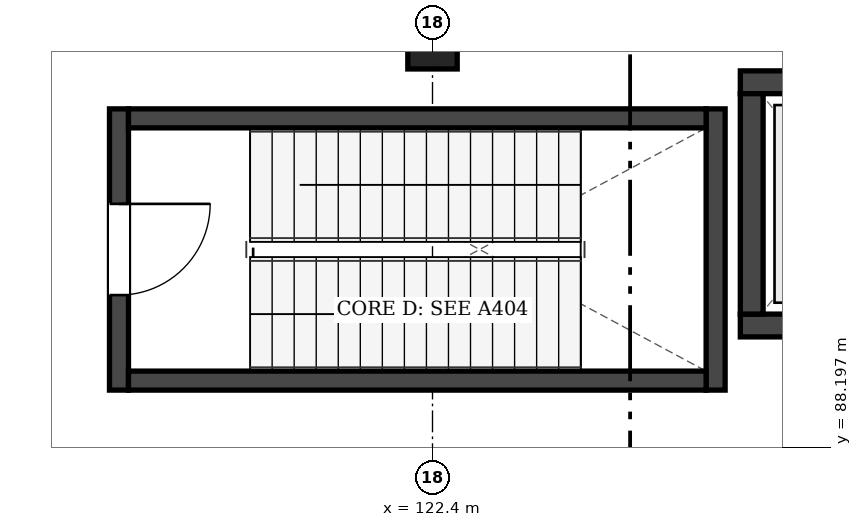
"""IFC4 building model, lengths in metres.
Left out: names, types, materials, properties, quantities, classifications, styles, units other than length and angle.
Written with IfcOpenShell. Run it as: python <this file> out.ifc"""

import sys

from ifc_helpers import new_model, si_unit, direction, frame, frame_2d, origin, origin_2d, place, context, subcontext, project, spatial, rectangle, extrude, element, fill, save


model = new_model("IFC4")
c1 = context("Model", 3, precision=1e-05, world=origin(), true_north=direction((0.0, 1.0)))
c2 = subcontext(c1, "Body", "Model", "MODEL_VIEW")
j1 = project(units=[si_unit("LENGTHUNIT", "METRE"), si_unit("PLANEANGLEUNIT", "RADIAN")], contexts=[c1])
p1 = place(None, origin())
s1 = spatial("IfcSite", under=j1, at=p1, CompositionType="ELEMENT")
p2 = place(p1, origin())
s2 = spatial("IfcBuilding", under=s1, at=p2, CompositionType="ELEMENT")
p3 = place(p2, frame((0.0, 0.0, 4.8)))
s3 = spatial("IfcBuildingStorey", under=s2, at=p3, CompositionType="ELEMENT", Elevation=4.8)
p4 = place(p3, frame((122.4, 93.6, 0.0), z_axis=(0.0, 0.0, 1.0), x_axis=(1.0, 0.0, 0.0)))
e1 = element("IfcColumn", 1, at=p4, inside=s3, PredefinedType="COLUMN", context=c2, shape_type="SweptSolid", body=[
    extrude(rectangle(XDim=0.65, YDim=0.85, at=origin_2d()), origin(), (0.0, 0.0, 1.0), 4.8),
])
p5 = place(p3, frame((126.45, 89.8, 0.0), z_axis=(0.0, 0.0, 1.0), x_axis=(1.0, 0.0, 0.0)))
e2 = element("IfcWall", 2, at=p5, inside=s3, PredefinedType="SHEAR", context=c2, shape_type="SweptSolid", body=[
    extrude(rectangle(XDim=2.9, YDim=0.3, at=frame_2d((1.45, 0.0))), origin(), (0.0, 0.0, 1.0), 4.55),
])
p6 = place(p5, frame((0.75, 0.0, 0.0)))
e3 = element("IfcOpeningElement", 3, at=p6, cuts=e2, PredefinedType="OPENING", context=c2, shape_type="SweptSolid", body=[
    extrude(rectangle(XDim=1.4, YDim=2.2, at=frame_2d((0.7, 1.1))), frame((0.0, 0.162, 0.0), z_axis=(0.0, -1.0, 0.0), x_axis=(1.0, 0.0, 0.0)), (0.0, 0.0, 1.0), 0.324),
])
for number, where, z_axis, x_axis in (
    (4, (126.45, 93.0, 0.0), (0.0, 0.0, 1.0), (1.0, 0.0, 0.0)),
    (5, (126.6, 89.95, 0.0), (0.0, 0.0, 1.0), (0.0, 1.0, 0.0)),
):
    element("IfcWall", number, at=place(p3, frame(where, z_axis=z_axis, x_axis=x_axis)), inside=s3, PredefinedType="SHEAR", context=c2, shape_type="SweptSolid", body=[
        extrude(rectangle(XDim=2.9, YDim=0.3, at=frame_2d((1.45, 0.0))), origin(), (0.0, 0.0, 1.0), 4.55),
    ])
p7 = place(p3, frame((118.275, 88.95, 0.0), z_axis=(0.0, 0.0, 1.0), x_axis=(0.0, 1.0, 0.0)))
e6 = element("IfcWall", 6, at=p7, inside=s3, PredefinedType="SHEAR", context=c2, shape_type="SweptSolid", body=[
    extrude(rectangle(XDim=3.7, YDim=0.25, at=frame_2d((1.85, 0.0))), origin(), (0.0, 0.0, 1.0), 4.55),
])
p8 = place(p7, frame((1.25, 0.0, 0.0)))
e7 = element("IfcOpeningElement", 7, at=p8, cuts=e6, PredefinedType="OPENING", context=c2, shape_type="SweptSolid", body=[
    extrude(rectangle(XDim=1.2, YDim=2.15, at=frame_2d((0.6, 1.075))), frame((0.0, 0.137, 0.0), z_axis=(0.0, -1.0, 0.0), x_axis=(1.0, 0.0, 0.0)), (0.0, 0.0, 1.0), 0.274),
])
p9 = place(p3, frame((126.125, 88.95, 0.0), z_axis=(0.0, 0.0, 1.0), x_axis=(0.0, 1.0, 0.0)))
e8 = element("IfcWall", 8, at=p9, inside=s3, PredefinedType="SHEAR", context=c2, shape_type="SweptSolid", body=[
    extrude(rectangle(XDim=3.7, YDim=0.25, at=frame_2d((1.85, 0.0))), origin(), (0.0, 0.0, 1.0), 4.55),
])
for number, where, z_axis, x_axis in (
    (9, (118.4, 89.075, 0.0), (0.0, 0.0, 1.0), (1.0, 0.0, 0.0)),
    (10, (118.4, 92.525, 0.0), (0.0, 0.0, 1.0), (1.0, 0.0, 0.0)),
):
    element("IfcWall", number, at=place(p3, frame(where, z_axis=z_axis, x_axis=x_axis)), inside=s3, PredefinedType="SHEAR", context=c2, shape_type="SweptSolid", body=[
        extrude(rectangle(XDim=7.6, YDim=0.25, at=frame_2d((3.8, 0.0))), origin(), (0.0, 0.0, 1.0), 4.55),
    ])
p10 = place(p8, frame((1.2, 0.0, 0.0), z_axis=(0.0, 0.0, 1.0), x_axis=(-1.0, 0.0, 0.0)))
e11 = element("IfcDoor", 11, at=p10, inside=s3, OperationType="SINGLE_SWING_LEFT", PredefinedType="DOOR", context=c2, shape_type="SweptSolid", body=[
    extrude(rectangle(XDim=1.2, YDim=2.15, at=frame_2d((0.6, 1.075))), frame((0.0, 0.025, 0.0), z_axis=(0.0, -1.0, 0.0), x_axis=(1.0, 0.0, 0.0)), (0.0, 0.0, 1.0), 0.05),
])
fill(e7, e11)
save(model, sys.argv[1])
